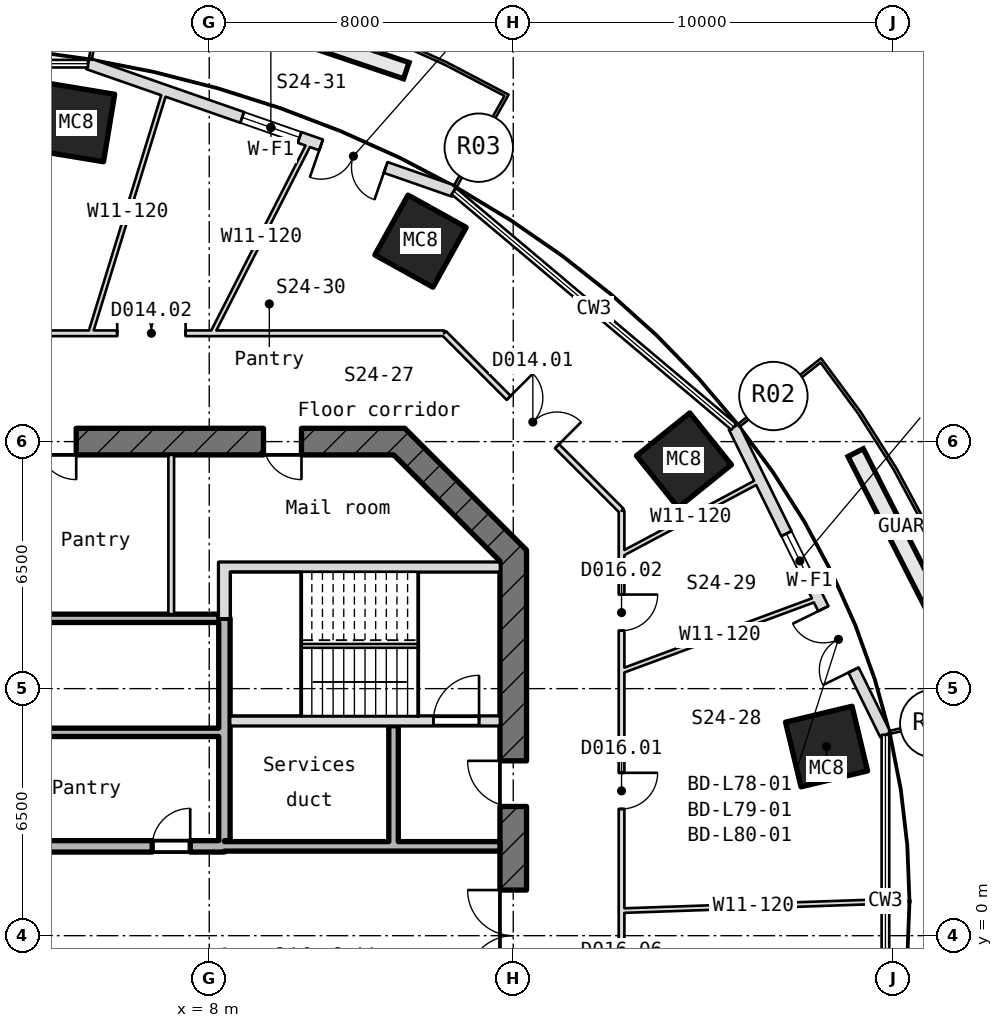
"""IFC4 building model, lengths in metres.
Left out: names, types, materials, properties, quantities, classifications, styles, units other than length and angle.
Written with IfcOpenShell. Run it as: python <this file> out.ifc"""

import sys

from ifc_helpers import new_model, si_unit, direction, frame, frame_2d, origin, origin_2d, place, context, subcontext, project, spatial, rectangle, hollow_rectangle, extrude, element, fill, save


model = new_model("IFC4")
c1 = context("Model", 3, precision=1e-05, world=origin(), true_north=direction((0.0, 1.0)))
c2 = subcontext(c1, "Body", "Model", "MODEL_VIEW")
j1 = project(units=[si_unit("LENGTHUNIT", "METRE"), si_unit("PLANEANGLEUNIT", "RADIAN")], contexts=[c1])
p1 = place(None, origin())
s1 = spatial("IfcSite", under=j1, at=p1, CompositionType="ELEMENT")
p2 = place(p1, origin())
s2 = spatial("IfcBuilding", under=s1, at=p2, CompositionType="ELEMENT")
p3 = place(p2, frame((0.0, 0.0, 346.75)))
s3 = spatial("IfcBuildingStorey", under=s2, at=p3, CompositionType="ELEMENT", Elevation=346.75)
for number, where, z_axis, x_axis in (
    (1, (24.244, 4.977, -0.18), (0.0, 0.0, 1.0), (0.233, -0.973, 0.0)),
    (2, (20.492, 12.509, -0.18), (0.0, 0.0, 1.0), (0.626, -0.78, 0.0)),
    (3, (13.56, 18.274, -0.18), (0.0, 0.0, 1.0), (0.874, -0.486, 0.0)),
    (4, (4.502, 21.395, -0.18), (0.0, 0.0, 1.0), (0.987, -0.163, 0.0)),
):
    element("IfcColumn", number, at=place(p3, frame(where, z_axis=z_axis, x_axis=x_axis)), inside=s3, PredefinedType="COLUMN", context=c2, shape_type="SweptSolid", body=[
        extrude(hollow_rectangle(XDim=1.75, YDim=1.8, WallThickness=0.055, at=origin_2d()), origin(), (0.0, 0.0, 1.0), 4.15),
    ])
p4 = place(p3, frame((25.794, 5.285, 0.0), z_axis=(0.0, 0.0, 1.0), x_axis=(-0.441581239579, 0.897221270842, 0.0)))
e5 = element("IfcWall", 5, at=p4, inside=s3, PredefinedType="SOLIDWALL", context=c2, shape_type="SweptSolid", body=[
    extrude(rectangle(XDim=9.03, YDim=0.3, at=frame_2d((4.515, 0.0))), origin(), (0.0, 0.0, 1.0), 3.97),
])
p5 = place(p4, frame((1.9, 0.0, 0.0)))
e6 = element("IfcOpeningElement", 6, at=p5, cuts=e5, PredefinedType="OPENING", context=c2, shape_type="SweptSolid", body=[
    extrude(rectangle(XDim=1.8, YDim=2.4, at=frame_2d((0.9, 1.2))), frame((0.0, 0.16, 0.0), z_axis=(0.0, -1.0, 0.0), x_axis=(1.0, 0.0, 0.0)), (0.0, 0.0, 1.0), 0.32),
])
p6 = place(p4, frame((4.3, 0.0, 0.9)))
e7 = element("IfcOpeningElement", 7, at=p6, cuts=e5, PredefinedType="OPENING", context=c2, shape_type="SweptSolid", body=[
    extrude(rectangle(XDim=1.6, YDim=1.5, at=frame_2d((0.8, 0.75))), frame((0.0, 0.16, 0.0), z_axis=(0.0, -1.0, 0.0), x_axis=(1.0, 0.0, 0.0)), (0.0, 0.0, 1.0), 0.32),
])
p7 = place(p3, frame((14.438, 19.588, 0.0), z_axis=(0.0, 0.0, 1.0), x_axis=(-0.944272378507, 0.329165118428, 0.0)))
e8 = element("IfcWall", 8, at=p7, inside=s3, PredefinedType="SOLIDWALL", context=c2, shape_type="SweptSolid", body=[
    extrude(rectangle(XDim=10.195, YDim=0.3, at=frame_2d((5.098, 0.0))), origin(), (0.0, 0.0, 1.0), 3.97),
])
p8 = place(p7, frame((1.9, 0.0, 0.0)))
e9 = element("IfcOpeningElement", 9, at=p8, cuts=e8, PredefinedType="OPENING", context=c2, shape_type="SweptSolid", body=[
    extrude(rectangle(XDim=1.8, YDim=2.4, at=frame_2d((0.9, 1.2))), frame((0.0, 0.16, 0.0), z_axis=(0.0, -1.0, 0.0), x_axis=(1.0, 0.0, 0.0)), (0.0, 0.0, 1.0), 0.32),
])
p9 = place(p7, frame((4.3, 0.0, 0.9)))
e10 = element("IfcOpeningElement", 10, at=p9, cuts=e8, PredefinedType="OPENING", context=c2, shape_type="SweptSolid", body=[
    extrude(rectangle(XDim=1.6, YDim=1.5, at=frame_2d((0.8, 0.75))), frame((0.0, 0.16, 0.0), z_axis=(0.0, -1.0, 0.0), x_axis=(1.0, 0.0, 0.0)), (0.0, 0.0, 1.0), 0.32),
])
p10 = place(p3, frame((16.0, -10.145, -0.18), z_axis=(0.0, 0.0, 1.0), x_axis=(0.0, 1.0, 0.0)))
e11 = element("IfcWall", 11, at=p10, inside=s3, PredefinedType="SHEAR", context=c2, shape_type="SweptSolid", body=[
    extrude(rectangle(XDim=20.29, YDim=0.7, at=frame_2d((10.145, 0.0))), origin(), (0.0, 0.0, 1.0), 4.15),
])
p11 = place(p10, frame((8.945, 0.0, 0.18)))
e12 = element("IfcOpeningElement", 12, at=p11, cuts=e11, PredefinedType="OPENING", context=c2, shape_type="SweptSolid", body=[
    extrude(rectangle(XDim=2.4, YDim=2.1, at=frame_2d((1.2, 1.05))), frame((0.0, 0.36, 0.0), z_axis=(0.0, -1.0, 0.0), x_axis=(1.0, 0.0, 0.0)), (0.0, 0.0, 1.0), 0.72),
])
p12 = place(p10, frame((13.545, 0.0, 0.18)))
e13 = element("IfcOpeningElement", 13, at=p12, cuts=e11, PredefinedType="OPENING", context=c2, shape_type="SweptSolid", body=[
    extrude(rectangle(XDim=1.2, YDim=2.1, at=frame_2d((0.6, 1.05))), frame((0.0, 0.36, 0.0), z_axis=(0.0, -1.0, 0.0), x_axis=(1.0, 0.0, 0.0)), (0.0, 0.0, 1.0), 0.72),
])
p13 = place(p3, frame((16.103, 9.897, -0.18), z_axis=(0.0, 0.0, 1.0), x_axis=(-0.707106781187, 0.707106781187, 0.0)))
e14 = element("IfcWall", 14, at=p13, inside=s3, PredefinedType="SHEAR", context=c2, shape_type="SweptSolid", body=[
    extrude(rectangle(XDim=4.533, YDim=0.7, at=frame_2d((2.266, 0.0))), origin(), (0.0, 0.0, 1.0), 4.15),
])
p14 = place(p3, frame((13.145, 13.0, -0.18), z_axis=(0.0, 0.0, 1.0), x_axis=(-1.0, 0.0, 0.0)))
e15 = element("IfcWall", 15, at=p14, inside=s3, PredefinedType="SHEAR", context=c2, shape_type="SweptSolid", body=[
    extrude(rectangle(XDim=26.29, YDim=0.7, at=frame_2d((13.145, 0.0))), origin(), (0.0, 0.0, 1.0), 4.15),
])
p15 = place(p14, frame((21.573, 0.0, 0.18)))
e16 = element("IfcOpeningElement", 16, at=p15, cuts=e15, PredefinedType="OPENING", context=c2, shape_type="SweptSolid", body=[
    extrude(rectangle(XDim=1.0, YDim=2.1, at=frame_2d((0.5, 1.05))), frame((0.0, 0.36, 0.0), z_axis=(0.0, -1.0, 0.0), x_axis=(1.0, 0.0, 0.0)), (0.0, 0.0, 1.0), 0.72),
])
p16 = place(p14, frame((14.645, 0.0, 0.18)))
e17 = element("IfcOpeningElement", 17, at=p16, cuts=e15, PredefinedType="OPENING", context=c2, shape_type="SweptSolid", body=[
    extrude(rectangle(XDim=1.0, YDim=2.1, at=frame_2d((0.5, 1.05))), frame((0.0, 0.36, 0.0), z_axis=(0.0, -1.0, 0.0), x_axis=(1.0, 0.0, 0.0)), (0.0, 0.0, 1.0), 0.72),
])
p17 = place(p14, frame((8.645, 0.0, 0.18)))
e18 = element("IfcOpeningElement", 18, at=p17, cuts=e15, PredefinedType="OPENING", context=c2, shape_type="SweptSolid", body=[
    extrude(rectangle(XDim=1.0, YDim=2.1, at=frame_2d((0.5, 1.05))), frame((0.0, 0.36, 0.0), z_axis=(0.0, -1.0, 0.0), x_axis=(1.0, 0.0, 0.0)), (0.0, 0.0, 1.0), 0.72),
])
p18 = place(p14, frame((2.717, 0.0, 0.18)))
e19 = element("IfcOpeningElement", 19, at=p18, cuts=e15, PredefinedType="OPENING", context=c2, shape_type="SweptSolid", body=[
    extrude(rectangle(XDim=1.0, YDim=2.1, at=frame_2d((0.5, 1.05))), frame((0.0, 0.36, 0.0), z_axis=(0.0, -1.0, 0.0), x_axis=(1.0, 0.0, 0.0)), (0.0, 0.0, 1.0), 0.72),
])
p19 = place(p3, frame((-8.4, 2.35, -0.18), z_axis=(0.0, 0.0, 1.0), x_axis=(1.0, 0.0, 0.0)))
e20 = element("IfcWall", 20, at=p19, inside=s3, PredefinedType="SHEAR", context=c2, shape_type="SweptSolid", body=[
    extrude(rectangle(XDim=16.8, YDim=0.3, at=frame_2d((8.4, 0.0))), origin(), (0.0, 0.0, 1.0), 4.15),
])
p20 = place(p19, frame((0.9, 0.0, 0.18)))
e21 = element("IfcOpeningElement", 21, at=p20, cuts=e20, PredefinedType="OPENING", context=c2, shape_type="SweptSolid", body=[
    extrude(rectangle(XDim=1.0, YDim=2.1, at=frame_2d((0.5, 1.05))), frame((0.0, 0.16, 0.0), z_axis=(0.0, -1.0, 0.0), x_axis=(1.0, 0.0, 0.0)), (0.0, 0.0, 1.0), 0.32),
])
p21 = place(p19, frame((14.9, 0.0, 0.18)))
e22 = element("IfcOpeningElement", 22, at=p21, cuts=e20, PredefinedType="OPENING", context=c2, shape_type="SweptSolid", body=[
    extrude(rectangle(XDim=1.0, YDim=2.1, at=frame_2d((0.5, 1.05))), frame((0.0, 0.16, 0.0), z_axis=(0.0, -1.0, 0.0), x_axis=(1.0, 0.0, 0.0)), (0.0, 0.0, 1.0), 0.32),
])
p22 = place(p3, frame((8.4, 2.35, 0.0), z_axis=(0.0, 0.0, 1.0), x_axis=(1.0, 0.0, 0.0)))
e23 = element("IfcWall", 23, at=p22, inside=s3, PredefinedType="STANDARD", context=c2, shape_type="SweptSolid", body=[
    extrude(rectangle(XDim=7.25, YDim=0.25, at=frame_2d((3.625, 0.0))), origin(), (0.0, 0.0, 1.0), 3.97),
])
p23 = place(p3, frame((2.8, 5.35, 0.0), z_axis=(0.0, 0.0, 1.0), x_axis=(1.0, 0.0, 0.0)))
e24 = element("IfcWall", 24, at=p23, inside=s3, PredefinedType="STANDARD", context=c2, shape_type="SweptSolid", body=[
    extrude(rectangle(XDim=5.45, YDim=0.22, at=frame_2d((2.725, 0.0))), origin(), (0.0, 0.0, 1.0), 3.97),
])
p24 = place(p3, frame((8.55, 5.65, -0.18), z_axis=(0.0, 0.0, 1.0), x_axis=(1.0, 0.0, 0.0)))
e25 = element("IfcWall", 25, at=p24, inside=s3, PredefinedType="SHEAR", context=c2, shape_type="SweptSolid", body=[
    extrude(rectangle(XDim=7.1, YDim=0.25, at=frame_2d((3.55, 0.0))), origin(), (0.0, 0.0, 1.0), 4.15),
])
p25 = place(p24, frame((5.35, 0.0, 0.18)))
e26 = element("IfcOpeningElement", 26, at=p25, cuts=e25, PredefinedType="OPENING", context=c2, shape_type="SweptSolid", body=[
    extrude(rectangle(XDim=1.2, YDim=2.1, at=frame_2d((0.6, 1.05))), frame((0.0, 0.135, 0.0), z_axis=(0.0, -1.0, 0.0), x_axis=(1.0, 0.0, 0.0)), (0.0, 0.0, 1.0), 0.27),
])
p26 = place(p3, frame((2.91, 8.35, 0.0), z_axis=(0.0, 0.0, 1.0), x_axis=(1.0, 0.0, 0.0)))
e27 = element("IfcWall", 27, at=p26, inside=s3, PredefinedType="STANDARD", context=c2, shape_type="SweptSolid", body=[
    extrude(rectangle(XDim=5.34, YDim=0.22, at=frame_2d((2.67, 0.0))), origin(), (0.0, 0.0, 1.0), 3.97),
])
p27 = place(p3, frame((8.55, 9.7, -0.18), z_axis=(0.0, 0.0, 1.0), x_axis=(1.0, 0.0, 0.0)))
e28 = element("IfcWall", 28, at=p27, inside=s3, PredefinedType="SHEAR", context=c2, shape_type="SweptSolid", body=[
    extrude(rectangle(XDim=7.1, YDim=0.25, at=frame_2d((3.55, 0.0))), origin(), (0.0, 0.0, 1.0), 4.15),
])
p28 = place(p3, frame((7.0, 8.46, 0.0), z_axis=(0.0, 0.0, 1.0), x_axis=(0.0, 1.0, 0.0)))
e29 = element("IfcWall", 29, at=p28, inside=s3, PredefinedType="PARTITIONING", context=c2, shape_type="SweptSolid", body=[
    extrude(rectangle(XDim=4.19, YDim=0.15, at=frame_2d((2.095, 0.0))), origin(), (0.0, 0.0, 1.0), 3.97),
])
p29 = place(p3, frame((8.4, 2.5, -0.18), z_axis=(0.0, 0.0, 1.0), x_axis=(0.0, 1.0, 0.0)))
e30 = element("IfcWall", 30, at=p29, inside=s3, PredefinedType="SHEAR", context=c2, shape_type="SweptSolid", body=[
    extrude(rectangle(XDim=5.85, YDim=0.3, at=frame_2d((2.925, 0.0))), origin(), (0.0, 0.0, 1.0), 4.15),
])
p30 = place(p3, frame((8.4, 8.35, -0.18), z_axis=(0.0, 0.0, 1.0), x_axis=(0.0, 1.0, 0.0)))
e31 = element("IfcWall", 31, at=p30, inside=s3, PredefinedType="SHEAR", context=c2, shape_type="SweptSolid", body=[
    extrude(rectangle(XDim=1.475, YDim=0.3, at=frame_2d((0.737, 0.0))), origin(), (0.0, 0.0, 1.0), 4.15),
])
p31 = place(p3, frame((12.85, 2.475, 0.0), z_axis=(0.0, 0.0, 1.0), x_axis=(0.0, 1.0, 0.0)))
e32 = element("IfcWall", 32, at=p31, inside=s3, PredefinedType="STANDARD", context=c2, shape_type="SweptSolid", body=[
    extrude(rectangle(XDim=3.05, YDim=0.25, at=frame_2d((1.525, 0.0))), origin(), (0.0, 0.0, 1.0), 3.97),
])
p32 = place(p3, frame((-14.18, 15.85, 0.0), z_axis=(0.0, 0.0, 1.0), x_axis=(1.0, 0.0, 0.0)))
e33 = element("IfcWall", 33, at=p32, inside=s3, PredefinedType="PARTITIONING", context=c2, shape_type="SweptSolid", body=[
    extrude(rectangle(XDim=28.361, YDim=0.15, at=frame_2d((14.18, 0.0))), origin(), (0.0, 0.0, 1.0), 3.97),
])
p33 = place(p32, frame((19.759, 0.0, 0.0)))
e34 = element("IfcOpeningElement", 34, at=p33, cuts=e33, PredefinedType="OPENING", context=c2, shape_type="SweptSolid", body=[
    extrude(rectangle(XDim=1.8, YDim=2.1, at=frame_2d((0.9, 1.05))), frame((0.0, 0.085, 0.0), z_axis=(0.0, -1.0, 0.0), x_axis=(1.0, 0.0, 0.0)), (0.0, 0.0, 1.0), 0.17),
])
p34 = place(p32, frame((12.703, 0.0, 0.0)))
e35 = element("IfcOpeningElement", 35, at=p34, cuts=e33, PredefinedType="OPENING", context=c2, shape_type="SweptSolid", body=[
    extrude(rectangle(XDim=0.95, YDim=2.1, at=frame_2d((0.475, 1.05))), frame((0.0, 0.085, 0.0), z_axis=(0.0, -1.0, 0.0), x_axis=(1.0, 0.0, 0.0)), (0.0, 0.0, 1.0), 0.17),
])
p35 = place(p3, frame((4.874, 15.85, 0.0), z_axis=(0.0, 0.0, 1.0), x_axis=(0.293957481335, 0.955818496979, 0.0)))
e36 = element("IfcWall", 36, at=p35, inside=s3, PredefinedType="PARTITIONING", context=c2, shape_type="SweptSolid", body=[
    extrude(rectangle(XDim=6.682, YDim=0.12, at=frame_2d((3.341, 0.0))), origin(), (0.0, 0.0, 1.0), 3.97),
])
p36 = place(p3, frame((8.083, 15.85, 0.0), z_axis=(0.0, 0.0, 1.0), x_axis=(0.454290570005, 0.890853567094, 0.0)))
e37 = element("IfcWall", 37, at=p36, inside=s3, PredefinedType="PARTITIONING", context=c2, shape_type="SweptSolid", body=[
    extrude(rectangle(XDim=5.674, YDim=0.12, at=frame_2d((2.837, 0.0))), origin(), (0.0, 0.0, 1.0), 3.97),
])
p37 = place(p3, frame((14.18, 15.85, 0.0), z_axis=(0.0, 0.0, 1.0), x_axis=(0.707106781187, -0.707106781187, 0.0)))
e38 = element("IfcWall", 38, at=p37, inside=s3, PredefinedType="PARTITIONING", context=c2, shape_type="SweptSolid", body=[
    extrude(rectangle(XDim=6.604, YDim=0.15, at=frame_2d((3.302, 0.0))), origin(), (0.0, 0.0, 1.0), 3.97),
])
p38 = place(p37, frame((2.402, 0.0, 0.0)))
e39 = element("IfcOpeningElement", 39, at=p38, cuts=e38, PredefinedType="OPENING", context=c2, shape_type="SweptSolid", body=[
    extrude(rectangle(XDim=1.8, YDim=2.1, at=frame_2d((0.9, 1.05))), frame((0.0, 0.085, 0.0), z_axis=(0.0, -1.0, 0.0), x_axis=(1.0, 0.0, 0.0)), (0.0, 0.0, 1.0), 0.17),
])
p39 = place(p3, frame((18.85, 0.658, 0.0), z_axis=(0.0, 0.0, 1.0), x_axis=(0.999392274324, 0.034858026656, 0.0)))
e40 = element("IfcWall", 40, at=p39, inside=s3, PredefinedType="PARTITIONING", context=c2, shape_type="SweptSolid", body=[
    extrude(rectangle(XDim=6.948, YDim=0.12, at=frame_2d((3.474, 0.0))), origin(), (0.0, 0.0, 1.0), 3.97),
])
p40 = place(p3, frame((18.85, 6.962, 0.0), z_axis=(0.0, 0.0, 1.0), x_axis=(0.93806639646, 0.346455532259, 0.0)))
e41 = element("IfcWall", 41, at=p40, inside=s3, PredefinedType="PARTITIONING", context=c2, shape_type="SweptSolid", body=[
    extrude(rectangle(XDim=5.519, YDim=0.12, at=frame_2d((2.76, 0.0))), origin(), (0.0, 0.0, 1.0), 3.97),
])
p41 = place(p3, frame((18.85, 10.04, 0.0), z_axis=(0.0, 0.0, 1.0), x_axis=(0.882609576654, 0.470106727454, 0.0)))
e42 = element("IfcWall", 42, at=p41, inside=s3, PredefinedType="PARTITIONING", context=c2, shape_type="SweptSolid", body=[
    extrude(rectangle(XDim=4.132, YDim=0.12, at=frame_2d((2.066, 0.0))), origin(), (0.0, 0.0, 1.0), 3.97),
])
p42 = place(p3, frame((18.85, 11.18, 0.0), z_axis=(0.0, 0.0, 1.0), x_axis=(0.0, -1.0, 0.0)))
e43 = element("IfcWall", 43, at=p42, inside=s3, PredefinedType="PARTITIONING", context=c2, shape_type="SweptSolid", body=[
    extrude(rectangle(XDim=22.361, YDim=0.15, at=frame_2d((11.18, 0.0))), origin(), (0.0, 0.0, 1.0), 3.97),
])
p43 = place(p42, frame((6.896, 0.0, 0.0)))
e44 = element("IfcOpeningElement", 44, at=p43, cuts=e43, PredefinedType="OPENING", context=c2, shape_type="SweptSolid", body=[
    extrude(rectangle(XDim=0.95, YDim=2.1, at=frame_2d((0.475, 1.05))), frame((0.0, 0.085, 0.0), z_axis=(0.0, -1.0, 0.0), x_axis=(1.0, 0.0, 0.0)), (0.0, 0.0, 1.0), 0.17),
])
p44 = place(p42, frame((2.205, 0.0, 0.0)))
e45 = element("IfcOpeningElement", 45, at=p44, cuts=e43, PredefinedType="OPENING", context=c2, shape_type="SweptSolid", body=[
    extrude(rectangle(XDim=0.95, YDim=2.1, at=frame_2d((0.475, 1.05))), frame((0.0, 0.085, 0.0), z_axis=(0.0, -1.0, 0.0), x_axis=(1.0, 0.0, 0.0)), (0.0, 0.0, 1.0), 0.17),
])
p45 = place(p42, frame((12.212, 0.0, 0.0)))
e46 = element("IfcOpeningElement", 46, at=p45, cuts=e43, PredefinedType="OPENING", context=c2, shape_type="SweptSolid", body=[
    extrude(rectangle(XDim=0.95, YDim=2.1, at=frame_2d((0.475, 1.05))), frame((0.0, 0.085, 0.0), z_axis=(0.0, -1.0, 0.0), x_axis=(1.0, 0.0, 0.0)), (0.0, 0.0, 1.0), 0.17),
])
p46 = place(p5, origin())
e47 = element("IfcDoor", 47, at=p46, inside=s3, OperationType="SINGLE_SWING_LEFT", PredefinedType="DOOR", context=c2, shape_type="SweptSolid", body=[
    extrude(rectangle(XDim=1.8, YDim=2.4, at=frame_2d((0.9, 1.2))), frame((0.0, 0.025, 0.0), z_axis=(0.0, -1.0, 0.0), x_axis=(1.0, 0.0, 0.0)), (0.0, 0.0, 1.0), 0.05),
])
fill(e6, e47)
p47 = place(p6, origin())
e48 = element("IfcWindow", 48, at=p47, inside=s3, PartitioningType="SINGLE_PANEL", PredefinedType="WINDOW", context=c2, shape_type="SweptSolid", body=[
    extrude(rectangle(XDim=1.6, YDim=1.5, at=frame_2d((0.8, 0.75))), frame((0.0, 0.03, 0.0), z_axis=(0.0, -1.0, 0.0), x_axis=(1.0, 0.0, 0.0)), (0.0, 0.0, 1.0), 0.06),
])
fill(e7, e48)
p48 = place(p8, origin())
e49 = element("IfcDoor", 49, at=p48, inside=s3, OperationType="SINGLE_SWING_LEFT", PredefinedType="DOOR", context=c2, shape_type="SweptSolid", body=[
    extrude(rectangle(XDim=1.8, YDim=2.4, at=frame_2d((0.9, 1.2))), frame((0.0, 0.025, 0.0), z_axis=(0.0, -1.0, 0.0), x_axis=(1.0, 0.0, 0.0)), (0.0, 0.0, 1.0), 0.05),
])
fill(e9, e49)
p49 = place(p9, origin())
e50 = element("IfcWindow", 50, at=p49, inside=s3, PartitioningType="SINGLE_PANEL", PredefinedType="WINDOW", context=c2, shape_type="SweptSolid", body=[
    extrude(rectangle(XDim=1.6, YDim=1.5, at=frame_2d((0.8, 0.75))), frame((0.0, 0.03, 0.0), z_axis=(0.0, -1.0, 0.0), x_axis=(1.0, 0.0, 0.0)), (0.0, 0.0, 1.0), 0.06),
])
fill(e10, e50)
p50 = place(p25, origin())
e51 = element("IfcDoor", 51, at=p50, inside=s3, OperationType="SINGLE_SWING_RIGHT", PredefinedType="DOOR", context=c2, shape_type="SweptSolid", body=[
    extrude(rectangle(XDim=1.2, YDim=2.1, at=frame_2d((0.6, 1.05))), frame((0.0, 0.025, 0.0), z_axis=(0.0, -1.0, 0.0), x_axis=(1.0, 0.0, 0.0)), (0.0, 0.0, 1.0), 0.05),
])
fill(e26, e51)
p51 = place(p11, origin())
e52 = element("IfcDoor", 52, at=p51, inside=s3, OperationType="DOUBLE_DOOR_SINGLE_SWING", PredefinedType="DOOR", context=c2, shape_type="SweptSolid", body=[
    extrude(rectangle(XDim=2.4, YDim=2.1, at=frame_2d((1.2, 1.05))), frame((0.0, 0.025, 0.0), z_axis=(0.0, -1.0, 0.0), x_axis=(1.0, 0.0, 0.0)), (0.0, 0.0, 1.0), 0.05),
])
fill(e12, e52)
p52 = place(p12, origin())
e53 = element("IfcDoor", 53, at=p52, inside=s3, OperationType="SINGLE_SWING_RIGHT", PredefinedType="DOOR", context=c2, shape_type="SweptSolid", body=[
    extrude(rectangle(XDim=1.2, YDim=2.1, at=frame_2d((0.6, 1.05))), frame((0.0, 0.025, 0.0), z_axis=(0.0, -1.0, 0.0), x_axis=(1.0, 0.0, 0.0)), (0.0, 0.0, 1.0), 0.05),
])
fill(e13, e53)
p53 = place(p21, origin())
e54 = element("IfcDoor", 54, at=p53, inside=s3, OperationType="SINGLE_SWING_RIGHT", PredefinedType="DOOR", context=c2, shape_type="SweptSolid", body=[
    extrude(rectangle(XDim=1.0, YDim=2.1, at=frame_2d((0.5, 1.05))), frame((0.0, 0.025, 0.0), z_axis=(0.0, -1.0, 0.0), x_axis=(1.0, 0.0, 0.0)), (0.0, 0.0, 1.0), 0.05),
])
fill(e22, e54)
p54 = place(p17, origin())
e55 = element("IfcDoor", 55, at=p54, inside=s3, OperationType="SINGLE_SWING_RIGHT", PredefinedType="DOOR", context=c2, shape_type="SweptSolid", body=[
    extrude(rectangle(XDim=1.0, YDim=2.1, at=frame_2d((0.5, 1.05))), frame((0.0, 0.025, 0.0), z_axis=(0.0, -1.0, 0.0), x_axis=(1.0, 0.0, 0.0)), (0.0, 0.0, 1.0), 0.05),
])
fill(e18, e55)
p55 = place(p18, origin())
e56 = element("IfcDoor", 56, at=p55, inside=s3, OperationType="SINGLE_SWING_RIGHT", PredefinedType="DOOR", context=c2, shape_type="SweptSolid", body=[
    extrude(rectangle(XDim=1.0, YDim=2.1, at=frame_2d((0.5, 1.05))), frame((0.0, 0.025, 0.0), z_axis=(0.0, -1.0, 0.0), x_axis=(1.0, 0.0, 0.0)), (0.0, 0.0, 1.0), 0.05),
])
fill(e19, e56)
p56 = place(p43, origin())
e57 = element("IfcDoor", 57, at=p56, inside=s3, OperationType="SINGLE_SWING_RIGHT", PredefinedType="DOOR", context=c2, shape_type="SweptSolid", body=[
    extrude(rectangle(XDim=0.95, YDim=2.1, at=frame_2d((0.475, 1.05))), frame((0.0, 0.025, 0.0), z_axis=(0.0, -1.0, 0.0), x_axis=(1.0, 0.0, 0.0)), (0.0, 0.0, 1.0), 0.05),
])
fill(e44, e57)
p57 = place(p44, origin())
e58 = element("IfcDoor", 58, at=p57, inside=s3, OperationType="SINGLE_SWING_RIGHT", PredefinedType="DOOR", context=c2, shape_type="SweptSolid", body=[
    extrude(rectangle(XDim=0.95, YDim=2.1, at=frame_2d((0.475, 1.05))), frame((0.0, 0.025, 0.0), z_axis=(0.0, -1.0, 0.0), x_axis=(1.0, 0.0, 0.0)), (0.0, 0.0, 1.0), 0.05),
])
fill(e45, e58)
p58 = place(p38, origin())
e59 = element("IfcDoor", 59, at=p58, inside=s3, OperationType="DOUBLE_DOOR_SINGLE_SWING", PredefinedType="DOOR", context=c2, shape_type="SweptSolid", body=[
    extrude(rectangle(XDim=1.8, YDim=2.1, at=frame_2d((0.9, 1.05))), frame((0.0, 0.025, 0.0), z_axis=(0.0, -1.0, 0.0), x_axis=(1.0, 0.0, 0.0)), (0.0, 0.0, 1.0), 0.05),
])
fill(e39, e59)
p59 = place(p33, origin())
e60 = element("IfcDoor", 60, at=p59, inside=s3, OperationType="DOUBLE_DOOR_SINGLE_SWING", PredefinedType="DOOR", context=c2, shape_type="SweptSolid", body=[
    extrude(rectangle(XDim=1.8, YDim=2.1, at=frame_2d((0.9, 1.05))), frame((0.0, 0.025, 0.0), z_axis=(0.0, -1.0, 0.0), x_axis=(1.0, 0.0, 0.0)), (0.0, 0.0, 1.0), 0.05),
])
fill(e34, e60)
save(model, sys.argv[1])
